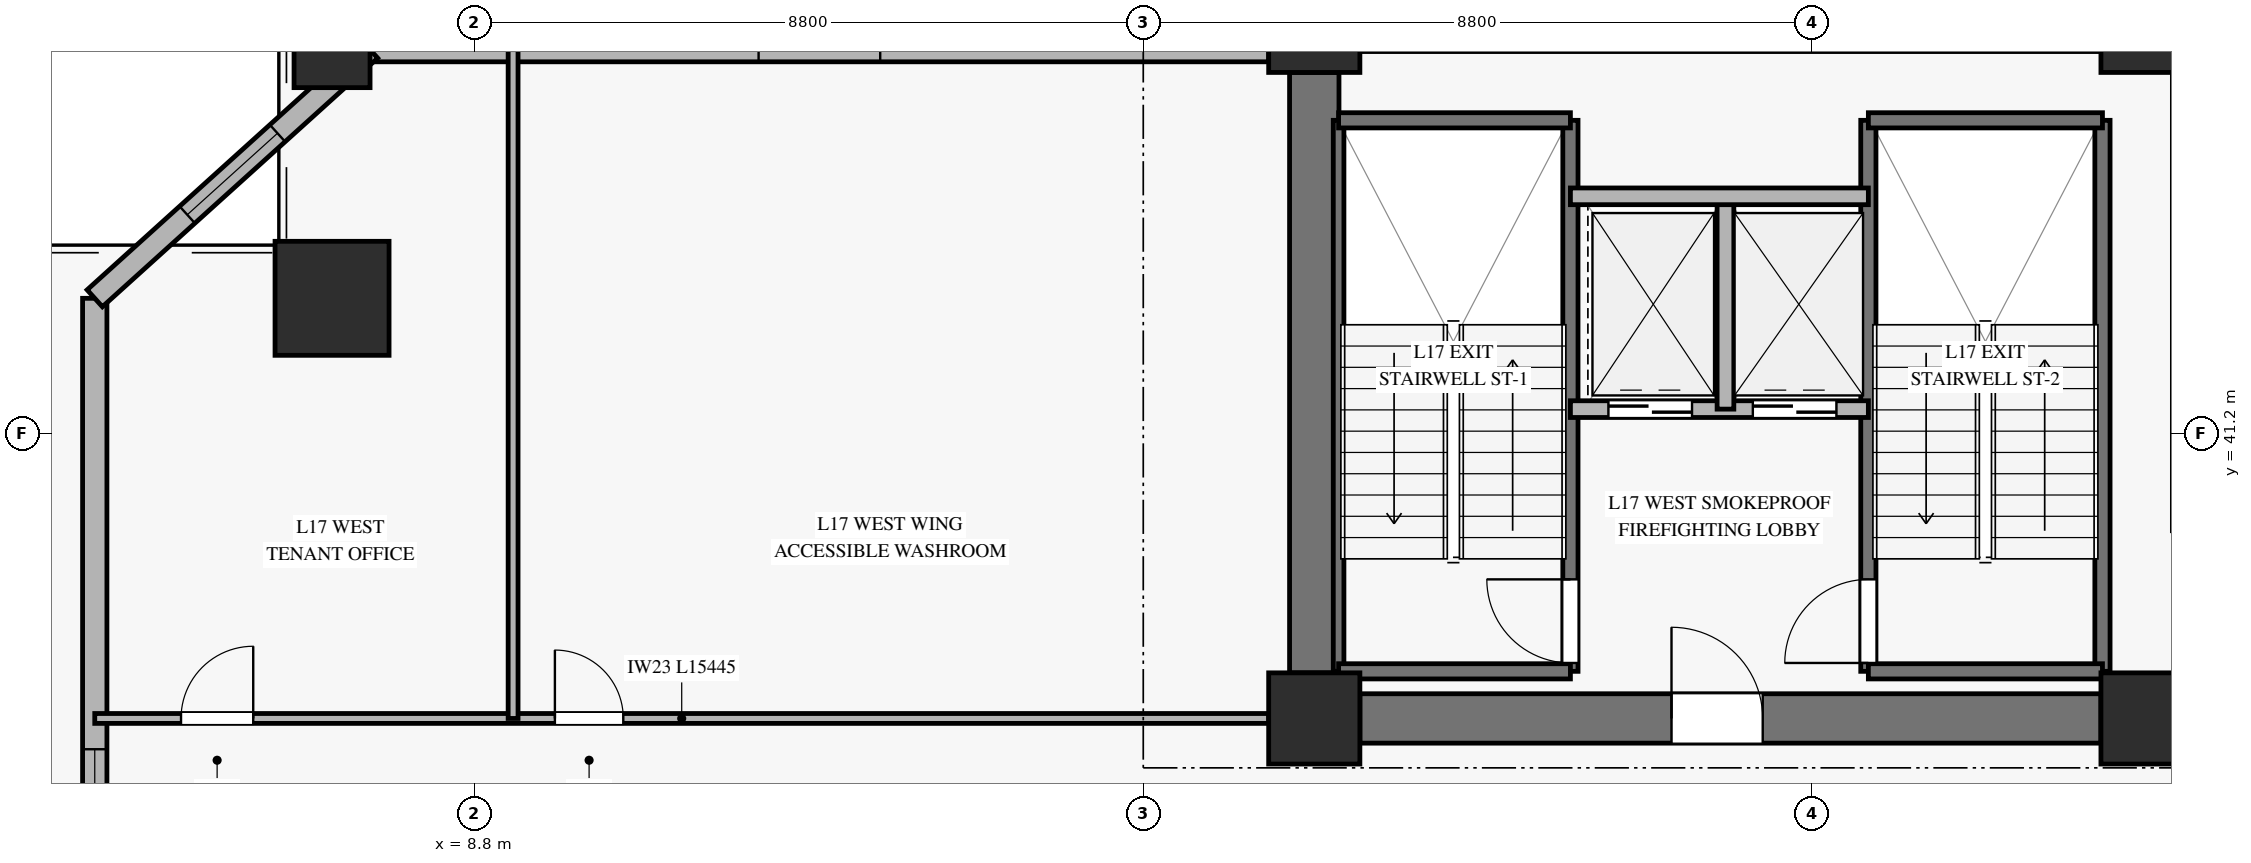
"""IFC4 building model, lengths in metres.
Left out: names, types, materials, properties, quantities, classifications, styles, units other than length and angle.
Written with IfcOpenShell. Run it as: python <this file> out.ifc"""

import sys

from ifc_helpers import new_model, si_unit, direction, frame, frame_2d, origin, origin_2d, place, context, subcontext, project, spatial, rectangle, hollow_rectangle, extrude, source, transform, mapped, element, fill, save


model = new_model("IFC4")
c1 = context("Model", 3, precision=1e-05, world=origin(), true_north=direction((0.0, 1.0)))
c2 = subcontext(c1, "Body", "Model", "MODEL_VIEW")
j1 = project(units=[si_unit("LENGTHUNIT", "METRE"), si_unit("PLANEANGLEUNIT", "RADIAN")], contexts=[c1])
p1 = place(None, origin())
s1 = spatial("IfcSite", under=j1, at=p1, CompositionType="ELEMENT")
p2 = place(p1, origin())
s2 = spatial("IfcBuilding", under=s1, at=p2, CompositionType="ELEMENT")
p3 = place(p2, frame((0.0, 0.0, 68.9)))
s3 = spatial("IfcBuildingStorey", under=s2, at=p3, CompositionType="ELEMENT", Elevation=68.9)
m1 = source(origin(), c2, "Body", "SweptSolid", [
    extrude(rectangle(XDim=1.2, YDim=1.2, at=origin_2d()), origin(), (0.0, 0.0, 1.0), 3.64),
])
for number, where, z_axis, x_axis in (
    (1, (19.85, 37.45, 0.0), (0.0, 0.0, 1.0), (1.0, 0.0, 0.0)),
    (2, (19.85, 46.55, 0.0), (0.0, 0.0, 1.0), (1.0, 0.0, 0.0)),
    (3, (30.8, 37.45, 0.0), (0.0, 0.0, 1.0), (1.0, 0.0, 0.0)),
    (4, (30.8, 46.55, 0.0), (0.0, 0.0, 1.0), (1.0, 0.0, 0.0)),
):
    element("IfcColumn", number, at=place(p3, frame(where, z_axis=z_axis, x_axis=x_axis)), inside=s3, PredefinedType="PILASTER", context=c2, shape_type="MappedRepresentation", body=[
        mapped(m1, transform((0.0, 0.0, 0.0), x_axis=(1.0, 0.0, 0.0), y_axis=(0.0, 1.0, 0.0), z_axis=(0.0, 0.0, 1.0), scale=1.0)),
    ])
p4 = place(p3, frame((20.45, 37.45, 0.0), z_axis=(0.0, 0.0, 1.0), x_axis=(1.0, 0.0, 0.0)))
e5 = element("IfcWall", 5, at=p4, inside=s3, PredefinedType="SHEAR", context=c2, shape_type="SweptSolid", body=[
    extrude(rectangle(XDim=9.75, YDim=0.65, at=frame_2d((4.875, 0.0))), origin(), (0.0, 0.0, 1.0), 3.64),
])
p5 = place(p4, frame((4.1, 0.0, 0.0)))
e6 = element("IfcOpeningElement", 6, at=p5, cuts=e5, PredefinedType="OPENING", context=c2, shape_type="SweptSolid", body=[
    extrude(rectangle(XDim=1.2, YDim=2.15, at=frame_2d((0.6, 1.075))), frame((0.0, 0.335, 0.0), z_axis=(0.0, -1.0, 0.0), x_axis=(1.0, 0.0, 0.0)), (0.0, 0.0, 1.0), 0.67),
])
p6 = place(p3, frame((19.85, 38.05, 0.0), z_axis=(0.0, 0.0, 1.0), x_axis=(0.0, 1.0, 0.0)))
e7 = element("IfcWall", 7, at=p6, inside=s3, PredefinedType="SHEAR", context=c2, shape_type="SweptSolid", body=[
    extrude(rectangle(XDim=7.9, YDim=0.65, at=frame_2d((3.95, 0.0))), origin(), (0.0, 0.0, 1.0), 3.64),
])
m2 = source(origin(), c2, "Body", "SweptSolid", [
    extrude(hollow_rectangle(XDim=1.5, YDim=1.5, WallThickness=0.07, at=origin_2d()), origin(), (0.0, 0.0, 1.0), 3.646),
])
p7 = place(p3, frame((6.927, 42.978, 0.0), z_axis=(0.057315308419, 0.007097456416, 0.998330897816), x_axis=(-0.122893119903, 0.992419911671, 0.0)))
e8 = element("IfcColumn", 8, at=p7, inside=s3, PredefinedType="COLUMN", context=c2, shape_type="MappedRepresentation", body=[
    mapped(m2, transform((0.0, 0.0, 0.0), x_axis=(1.0, 0.0, 0.0), y_axis=(0.0, 1.0, 0.0), z_axis=(0.0, 0.0, 1.0), scale=1.0)),
])
m3 = source(origin(), c2, "Body", "SweptSolid", [
    extrude(hollow_rectangle(XDim=1.0, YDim=1.0, WallThickness=0.045, at=origin_2d()), origin(), (0.0, 0.0, 1.0), 3.646),
])
p8 = place(p3, frame((6.927, 46.25, 0.0), z_axis=(0.057316752071, 0.0, 0.99835604367), x_axis=(0.0, 1.0, 0.0)))
e9 = element("IfcColumn", 9, at=p8, inside=s3, PredefinedType="COLUMN", context=c2, shape_type="MappedRepresentation", body=[
    mapped(m3, transform((0.0, 0.0, 0.0), x_axis=(1.0, 0.0, 0.0), y_axis=(0.0, 1.0, 0.0), z_axis=(0.0, 0.0, 1.0), scale=1.0)),
])
p9 = place(p3, frame((3.805, 25.991, 0.0), z_axis=(0.0, 0.0, 1.0), x_axis=(0.0, 1.0, 0.0)))
e10 = element("IfcWall", 10, at=p9, inside=s3, PredefinedType="SOLIDWALL", context=c2, shape_type="SweptSolid", body=[
    extrude(rectangle(XDim=16.987, YDim=0.32, at=frame_2d((8.494, 0.0))), origin(), (0.0, 0.0, 1.0), 3.12),
])
p10 = place(p9, frame((8.654, 0.0, 0.45)))
e11 = element("IfcOpeningElement", 11, at=p10, cuts=e10, PredefinedType="OPENING", context=c2, shape_type="SweptSolid", body=[
    extrude(rectangle(XDim=2.4, YDim=2.1, at=frame_2d((1.2, 1.05))), frame((0.0, 0.17, 0.0), z_axis=(0.0, -1.0, 0.0), x_axis=(1.0, 0.0, 0.0)), (0.0, 0.0, 1.0), 0.34),
])
p11 = place(p3, frame((7.427, 46.25, 0.0), z_axis=(0.0, 0.0, 1.0), x_axis=(1.0, 0.0, 0.0)))
e12 = element("IfcWall", 12, at=p11, inside=s3, PredefinedType="SOLIDWALL", context=c2, shape_type="SweptSolid", body=[
    extrude(rectangle(XDim=11.823, YDim=0.32, at=frame_2d((5.912, 0.0))), origin(), (0.0, 0.0, 1.0), 3.12),
])
p12 = place(p11, frame((5.112, 0.0, 0.45)))
e13 = element("IfcOpeningElement", 13, at=p12, cuts=e12, PredefinedType="OPENING", context=c2, shape_type="SweptSolid", body=[
    extrude(rectangle(XDim=1.6, YDim=2.0, at=frame_2d((0.8, 1.0))), frame((0.0, 0.17, 0.0), z_axis=(0.0, -1.0, 0.0), x_axis=(1.0, 0.0, 0.0)), (0.0, 0.0, 1.0), 0.34),
])
p13 = place(p3, frame((7.427, 46.25, 0.0), z_axis=(0.0, 0.0, 1.0), x_axis=(-0.742059302274, -0.670334238951, 0.0)))
e14 = element("IfcWall", 14, at=p13, inside=s3, PredefinedType="SOLIDWALL", context=c2, shape_type="SweptSolid", body=[
    extrude(rectangle(XDim=4.881, YDim=0.3, at=frame_2d((2.44, 0.0))), origin(), (0.0, 0.0, 1.0), 3.12),
])
p14 = place(p13, frame((1.641, 0.0, 0.45)))
e15 = element("IfcOpeningElement", 15, at=p14, cuts=e14, PredefinedType="OPENING", context=c2, shape_type="SweptSolid", body=[
    extrude(rectangle(XDim=1.6, YDim=2.0, at=frame_2d((0.8, 1.0))), frame((0.0, 0.16, 0.0), z_axis=(0.0, -1.0, 0.0), x_axis=(1.0, 0.0, 0.0)), (0.0, 0.0, 1.0), 0.32),
])
p15 = place(p3, frame((20.17, 38.07, 0.0), z_axis=(0.0, 0.0, 1.0), x_axis=(0.0, 1.0, 0.0)))
e16 = element("IfcWall", 16, at=p15, inside=s3, PredefinedType="SOLIDWALL", context=c2, shape_type="SweptSolid", body=[
    extrude(rectangle(XDim=7.25, YDim=0.14, at=frame_2d((3.625, 0.0))), origin(), (0.0, 0.0, 1.0), 3.9),
])
p16 = place(p3, frame((23.22, 38.07, 0.0), z_axis=(0.0, 0.0, 1.0), x_axis=(0.0, 1.0, 0.0)))
e17 = element("IfcWall", 17, at=p16, inside=s3, PredefinedType="SOLIDWALL", context=c2, shape_type="SweptSolid", body=[
    extrude(rectangle(XDim=7.25, YDim=0.2, at=frame_2d((3.625, 0.0))), origin(), (0.0, 0.0, 1.0), 3.9),
])
p17 = place(p16, frame((0.11, 0.0, 0.0)))
e18 = element("IfcOpeningElement", 18, at=p17, cuts=e17, PredefinedType="OPENING", context=c2, shape_type="SweptSolid", body=[
    extrude(rectangle(XDim=1.1, YDim=2.15, at=frame_2d((0.55, 1.075))), frame((0.0, 0.11, 0.0), z_axis=(0.0, -1.0, 0.0), x_axis=(1.0, 0.0, 0.0)), (0.0, 0.0, 1.0), 0.22),
])
for number, where, z_axis, x_axis in (
    (19, (20.17, 45.32, 0.0), (0.0, 0.0, 1.0), (1.0, 0.0, 0.0)),
    (20, (20.17, 38.07, 0.0), (0.0, 0.0, 1.0), (1.0, 0.0, 0.0)),
):
    element("IfcWall", number, at=place(p3, frame(where, z_axis=z_axis, x_axis=x_axis)), inside=s3, PredefinedType="SOLIDWALL", context=c2, shape_type="SweptSolid", body=[
        extrude(rectangle(XDim=3.05, YDim=0.2, at=frame_2d((1.525, 0.0))), origin(), (0.0, 0.0, 1.0), 3.9),
    ])
p18 = place(p3, frame((27.14, 38.07, 0.0), z_axis=(0.0, 0.0, 1.0), x_axis=(0.0, 1.0, 0.0)))
e21 = element("IfcWall", 21, at=p18, inside=s3, PredefinedType="SOLIDWALL", context=c2, shape_type="SweptSolid", body=[
    extrude(rectangle(XDim=7.25, YDim=0.2, at=frame_2d((3.625, 0.0))), origin(), (0.0, 0.0, 1.0), 3.9),
])
p19 = place(p18, frame((0.11, 0.0, 0.0)))
e22 = element("IfcOpeningElement", 22, at=p19, cuts=e21, PredefinedType="OPENING", context=c2, shape_type="SweptSolid", body=[
    extrude(rectangle(XDim=1.1, YDim=2.15, at=frame_2d((0.55, 1.075))), frame((0.0, 0.11, 0.0), z_axis=(0.0, -1.0, 0.0), x_axis=(1.0, 0.0, 0.0)), (0.0, 0.0, 1.0), 0.22),
])
p20 = place(p3, frame((30.22, 38.07, 0.0), z_axis=(0.0, 0.0, 1.0), x_axis=(0.0, 1.0, 0.0)))
e23 = element("IfcWall", 23, at=p20, inside=s3, PredefinedType="SOLIDWALL", context=c2, shape_type="SweptSolid", body=[
    extrude(rectangle(XDim=7.25, YDim=0.2, at=frame_2d((3.625, 0.0))), origin(), (0.0, 0.0, 1.0), 3.9),
])
for number, where, z_axis, x_axis in (
    (24, (27.14, 45.32, 0.0), (0.0, 0.0, 1.0), (1.0, 0.0, 0.0)),
    (25, (27.14, 38.07, 0.0), (0.0, 0.0, 1.0), (1.0, 0.0, 0.0)),
):
    element("IfcWall", number, at=place(p3, frame(where, z_axis=z_axis, x_axis=x_axis)), inside=s3, PredefinedType="SOLIDWALL", context=c2, shape_type="SweptSolid", body=[
        extrude(rectangle(XDim=3.08, YDim=0.2, at=frame_2d((1.54, 0.0))), origin(), (0.0, 0.0, 1.0), 3.9),
    ])
p21 = place(p3, frame((23.22, 41.52, 0.0), z_axis=(0.0, 0.0, 1.0), x_axis=(1.0, 0.0, 0.0)))
e26 = element("IfcWall", 26, at=p21, inside=s3, PredefinedType="SOLIDWALL", context=c2, shape_type="SweptSolid", body=[
    extrude(rectangle(XDim=3.92, YDim=0.22, at=frame_2d((1.96, 0.0))), origin(), (0.0, 0.0, 1.0), 3.64),
])
p22 = place(p21, frame((0.5, 0.0, 0.0)))
e27 = element("IfcOpeningElement", 27, at=p22, cuts=e26, PredefinedType="OPENING", context=c2, shape_type="SweptSolid", body=[
    extrude(rectangle(XDim=1.1, YDim=2.2, at=frame_2d((0.55, 1.1))), frame((0.0, 0.12, 0.0), z_axis=(0.0, -1.0, 0.0), x_axis=(1.0, 0.0, 0.0)), (0.0, 0.0, 1.0), 0.24),
])
p23 = place(p21, frame((2.4, 0.0, 0.0)))
e28 = element("IfcOpeningElement", 28, at=p23, cuts=e26, PredefinedType="OPENING", context=c2, shape_type="SweptSolid", body=[
    extrude(rectangle(XDim=1.1, YDim=2.2, at=frame_2d((0.55, 1.1))), frame((0.0, 0.12, 0.0), z_axis=(0.0, -1.0, 0.0), x_axis=(1.0, 0.0, 0.0)), (0.0, 0.0, 1.0), 0.24),
])
p24 = place(p3, frame((25.26, 41.52, 0.0), z_axis=(0.0, 0.0, 1.0), x_axis=(0.0, 1.0, 0.0)))
e29 = element("IfcWall", 29, at=p24, inside=s3, PredefinedType="SOLIDWALL", context=c2, shape_type="SweptSolid", body=[
    extrude(rectangle(XDim=2.8, YDim=0.22, at=frame_2d((1.4, 0.0))), origin(), (0.0, 0.0, 1.0), 3.64),
])
p25 = place(p3, frame((23.22, 44.32, 0.0), z_axis=(0.0, 0.0, 1.0), x_axis=(1.0, 0.0, 0.0)))
e30 = element("IfcWall", 30, at=p25, inside=s3, PredefinedType="SOLIDWALL", context=c2, shape_type="SweptSolid", body=[
    extrude(rectangle(XDim=3.92, YDim=0.22, at=frame_2d((1.96, 0.0))), origin(), (0.0, 0.0, 1.0), 3.64),
])
p26 = place(p3, frame((3.805, 37.45, 0.0), z_axis=(0.0, 0.0, 1.0), x_axis=(1.0, 0.0, 0.0)))
e31 = element("IfcWall", 31, at=p26, inside=s3, PredefinedType="PARTITIONING", context=c2, shape_type="SweptSolid", body=[
    extrude(rectangle(XDim=15.445, YDim=0.13, at=frame_2d((7.723, 0.0))), origin(), (0.0, 0.0, 1.0), 3.125),
])
p27 = place(p26, frame((1.135, 0.0, 0.0)))
e32 = element("IfcOpeningElement", 32, at=p27, cuts=e31, PredefinedType="OPENING", context=c2, shape_type="SweptSolid", body=[
    extrude(rectangle(XDim=0.95, YDim=2.1, at=frame_2d((0.475, 1.05))), frame((0.0, 0.075, 0.0), z_axis=(0.0, -1.0, 0.0), x_axis=(1.0, 0.0, 0.0)), (0.0, 0.0, 1.0), 0.15),
])
p28 = place(p26, frame((6.054, 0.0, 0.0)))
e33 = element("IfcOpeningElement", 33, at=p28, cuts=e31, PredefinedType="OPENING", context=c2, shape_type="SweptSolid", body=[
    extrude(rectangle(XDim=0.9, YDim=2.1, at=frame_2d((0.45, 1.05))), frame((0.0, 0.075, 0.0), z_axis=(0.0, -1.0, 0.0), x_axis=(1.0, 0.0, 0.0)), (0.0, 0.0, 1.0), 0.15),
])
p29 = place(p3, frame((9.309, 37.45, 0.0), z_axis=(0.0, 0.0, 1.0), x_axis=(0.0, 1.0, 0.0)))
e34 = element("IfcWall", 34, at=p29, inside=s3, PredefinedType="PARTITIONING", context=c2, shape_type="SweptSolid", body=[
    extrude(rectangle(XDim=8.8, YDim=0.13, at=frame_2d((4.4, 0.0))), origin(), (0.0, 0.0, 1.0), 3.64),
])
m4 = source(origin(), c2, "Body", "SweptSolid", [
    extrude(rectangle(XDim=2.4, YDim=2.1, at=frame_2d((1.2, 1.05))), frame((0.0, 0.03, 0.0), z_axis=(0.0, -1.0, 0.0), x_axis=(1.0, 0.0, 0.0)), (0.0, 0.0, 1.0), 0.06),
])
p30 = place(p10, origin())
e35 = element("IfcWindow", 35, at=p30, inside=s3, PartitioningType="SINGLE_PANEL", PredefinedType="WINDOW", context=c2, shape_type="MappedRepresentation", body=[
    mapped(m4, transform((0.0, 0.0, 0.0), x_axis=(1.0, 0.0, 0.0), y_axis=(0.0, 1.0, 0.0), z_axis=(0.0, 0.0, 1.0), scale=1.0)),
])
fill(e11, e35)
m5 = source(origin(), c2, "Body", "SweptSolid", [
    extrude(rectangle(XDim=1.6, YDim=2.0, at=frame_2d((0.8, 1.0))), frame((0.0, 0.03, 0.0), z_axis=(0.0, -1.0, 0.0), x_axis=(1.0, 0.0, 0.0)), (0.0, 0.0, 1.0), 0.06),
])
p31 = place(p14, origin())
e36 = element("IfcWindow", 36, at=p31, inside=s3, PartitioningType="SINGLE_PANEL", PredefinedType="WINDOW", context=c2, shape_type="MappedRepresentation", body=[
    mapped(m5, transform((0.0, 0.0, 0.0), x_axis=(1.0, 0.0, 0.0), y_axis=(0.0, 1.0, 0.0), z_axis=(0.0, 0.0, 1.0), scale=1.0)),
])
fill(e15, e36)
m6 = source(origin(), c2, "Body", "SweptSolid", [
    extrude(rectangle(XDim=1.1, YDim=2.15, at=frame_2d((0.55, 1.075))), frame((0.0, 0.025, 0.0), z_axis=(0.0, -1.0, 0.0), x_axis=(1.0, 0.0, 0.0)), (0.0, 0.0, 1.0), 0.05),
])
p32 = place(p17, origin())
e37 = element("IfcDoor", 37, at=p32, inside=s3, OperationType="SINGLE_SWING_RIGHT", PredefinedType="DOOR", context=c2, shape_type="MappedRepresentation", body=[
    mapped(m6, transform((0.0, 0.0, 0.0), x_axis=(1.0, 0.0, 0.0), y_axis=(0.0, 1.0, 0.0), z_axis=(0.0, 0.0, 1.0), scale=1.0)),
])
fill(e18, e37)
p33 = place(p19, origin())
e38 = element("IfcDoor", 38, at=p33, inside=s3, OperationType="SINGLE_SWING_LEFT", PredefinedType="DOOR", context=c2, shape_type="MappedRepresentation", body=[
    mapped(m6, transform((0.0, 0.0, 0.0), x_axis=(1.0, 0.0, 0.0), y_axis=(0.0, 1.0, 0.0), z_axis=(0.0, 0.0, 1.0), scale=1.0)),
])
fill(e22, e38)
m7 = source(origin(), c2, "Body", "SweptSolid", [
    extrude(rectangle(XDim=1.1, YDim=2.2, at=frame_2d((0.55, 1.1))), frame((0.0, 0.025, 0.0), z_axis=(0.0, -1.0, 0.0), x_axis=(1.0, 0.0, 0.0)), (0.0, 0.0, 1.0), 0.05),
])
p34 = place(p22, origin())
e39 = element("IfcDoor", 39, at=p34, inside=s3, OperationType="SLIDING_TO_LEFT", PredefinedType="DOOR", context=c2, shape_type="MappedRepresentation", body=[
    mapped(m7, transform((0.0, 0.0, 0.0), x_axis=(1.0, 0.0, 0.0), y_axis=(0.0, 1.0, 0.0), z_axis=(0.0, 0.0, 1.0), scale=1.0)),
])
fill(e27, e39)
p35 = place(p23, origin())
e40 = element("IfcDoor", 40, at=p35, inside=s3, OperationType="SLIDING_TO_LEFT", PredefinedType="DOOR", context=c2, shape_type="MappedRepresentation", body=[
    mapped(m7, transform((0.0, 0.0, 0.0), x_axis=(1.0, 0.0, 0.0), y_axis=(0.0, 1.0, 0.0), z_axis=(0.0, 0.0, 1.0), scale=1.0)),
])
fill(e28, e40)
m8 = source(origin(), c2, "Body", "SweptSolid", [
    extrude(rectangle(XDim=1.2, YDim=2.15, at=frame_2d((0.6, 1.075))), frame((0.0, 0.025, 0.0), z_axis=(0.0, -1.0, 0.0), x_axis=(1.0, 0.0, 0.0)), (0.0, 0.0, 1.0), 0.05),
])
p36 = place(p5, origin())
e41 = element("IfcDoor", 41, at=p36, inside=s3, OperationType="SINGLE_SWING_LEFT", PredefinedType="DOOR", context=c2, shape_type="MappedRepresentation", body=[
    mapped(m8, transform((0.0, 0.0, 0.0), x_axis=(1.0, 0.0, 0.0), y_axis=(0.0, 1.0, 0.0), z_axis=(0.0, 0.0, 1.0), scale=1.0)),
])
fill(e6, e41)
m9 = source(origin(), c2, "Body", "SweptSolid", [
    extrude(rectangle(XDim=0.95, YDim=2.1, at=frame_2d((0.475, 1.05))), frame((0.0, 0.025, 0.0), z_axis=(0.0, -1.0, 0.0), x_axis=(1.0, 0.0, 0.0)), (0.0, 0.0, 1.0), 0.05),
])
p37 = place(p27, origin())
e42 = element("IfcDoor", 42, at=p37, inside=s3, OperationType="SINGLE_SWING_RIGHT", PredefinedType="DOOR", context=c2, shape_type="MappedRepresentation", body=[
    mapped(m9, transform((0.0, 0.0, 0.0), x_axis=(1.0, 0.0, 0.0), y_axis=(0.0, 1.0, 0.0), z_axis=(0.0, 0.0, 1.0), scale=1.0)),
])
fill(e32, e42)
m10 = source(origin(), c2, "Body", "SweptSolid", [
    extrude(rectangle(XDim=0.9, YDim=2.1, at=frame_2d((0.45, 1.05))), frame((0.0, 0.025, 0.0), z_axis=(0.0, -1.0, 0.0), x_axis=(1.0, 0.0, 0.0)), (0.0, 0.0, 1.0), 0.05),
])
p38 = place(p28, origin())
e43 = element("IfcDoor", 43, at=p38, inside=s3, OperationType="SINGLE_SWING_LEFT", PredefinedType="DOOR", context=c2, shape_type="MappedRepresentation", body=[
    mapped(m10, transform((0.0, 0.0, 0.0), x_axis=(1.0, 0.0, 0.0), y_axis=(0.0, 1.0, 0.0), z_axis=(0.0, 0.0, 1.0), scale=1.0)),
])
fill(e33, e43)
save(model, sys.argv[1])
